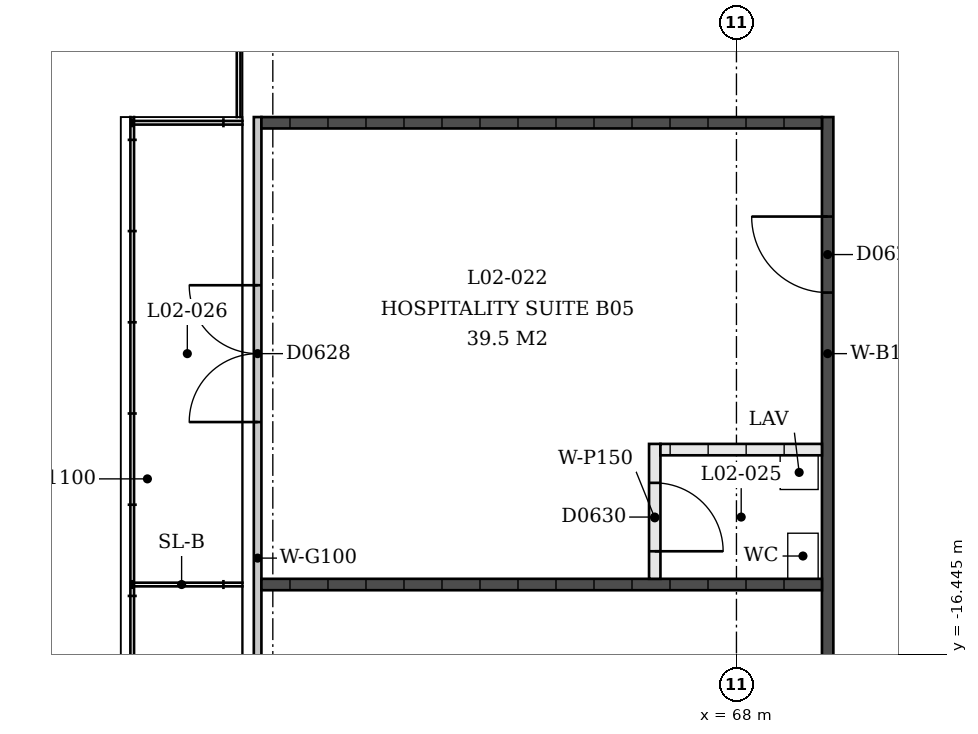
"""IFC4 building model, lengths in metres.
Left out: names, types, materials, properties, quantities, classifications, styles, units other than length and angle.
Written with IfcOpenShell. Run it as: python <this file> out.ifc"""

import sys

from ifc_helpers import new_model, si_unit, direction, frame, frame_2d, origin, place, context, subcontext, project, spatial, rectangle, extrude, element, fill, save


model = new_model("IFC4")
c1 = context("Model", 3, precision=1e-05, world=origin(), true_north=direction((0.0, 1.0)))
c2 = subcontext(c1, "Body", "Model", "MODEL_VIEW")
j1 = project(units=[si_unit("LENGTHUNIT", "METRE"), si_unit("PLANEANGLEUNIT", "RADIAN")], contexts=[c1])
p1 = place(None, origin())
s1 = spatial("IfcSite", under=j1, at=p1, CompositionType="ELEMENT")
p2 = place(p1, origin())
s2 = spatial("IfcBuilding", under=s1, at=p2, CompositionType="ELEMENT")
p3 = place(p2, frame((0.0, 0.0, 9.0)))
s3 = spatial("IfcBuildingStorey", under=s2, at=p3, CompositionType="ELEMENT", Elevation=9.0)
p4 = place(p3, frame((61.7, -22.0, 0.0), z_axis=(0.0, 0.0, 1.0), x_axis=(0.0, 1.0, 0.0)))
e1 = element("IfcWall", 1, at=p4, inside=s3, PredefinedType="PARTITIONING", context=c2, shape_type="SweptSolid", body=[
    extrude(rectangle(XDim=12.625, YDim=0.1, at=frame_2d((6.312, 0.0))), origin(), (0.0, 0.0, 1.0), 3.0),
])
p5 = place(p4, frame((2.538, 0.0, 0.0)))
e2 = element("IfcOpeningElement", 2, at=p5, cuts=e1, PredefinedType="OPENING", context=c2, shape_type="SweptSolid", body=[
    extrude(rectangle(XDim=1.8, YDim=2.1, at=frame_2d((0.9, 1.05))), frame((0.0, 0.05, 0.0), z_axis=(0.0, -1.0, 0.0), x_axis=(1.0, 0.0, 0.0)), (0.0, 0.0, 1.0), 0.1),
])
p6 = place(p4, frame((8.613, 0.0, 0.0)))
e3 = element("IfcOpeningElement", 3, at=p6, cuts=e1, PredefinedType="OPENING", context=c2, shape_type="SweptSolid", body=[
    extrude(rectangle(XDim=1.8, YDim=2.1, at=frame_2d((0.9, 1.05))), frame((0.0, 0.05, 0.0), z_axis=(0.0, -1.0, 0.0), x_axis=(1.0, 0.0, 0.0)), (0.0, 0.0, 1.0), 0.1),
])
p7 = place(p3, frame((69.2, -21.675, 0.0), z_axis=(0.0, 0.0, 1.0), x_axis=(0.0, 1.0, 0.0)))
e4 = element("IfcWall", 4, at=p7, inside=s3, PredefinedType="SOLIDWALL", context=c2, shape_type="SweptSolid", body=[
    extrude(rectangle(XDim=12.3, YDim=0.15, at=frame_2d((6.15, 0.0))), origin(), (0.0, 0.0, 1.0), 3.0),
])
p8 = place(p7, frame((3.916, 0.0, 0.0)))
e5 = element("IfcOpeningElement", 5, at=p8, cuts=e4, PredefinedType="OPENING", context=c2, shape_type="SweptSolid", body=[
    extrude(rectangle(XDim=1.0, YDim=2.1, at=frame_2d((0.5, 1.05))), frame((0.0, 0.075, 0.0), z_axis=(0.0, -1.0, 0.0), x_axis=(1.0, 0.0, 0.0)), (0.0, 0.0, 1.0), 0.15),
])
p9 = place(p7, frame((9.991, 0.0, 0.0)))
e6 = element("IfcOpeningElement", 6, at=p9, cuts=e4, PredefinedType="OPENING", context=c2, shape_type="SweptSolid", body=[
    extrude(rectangle(XDim=1.0, YDim=2.1, at=frame_2d((0.5, 1.05))), frame((0.0, 0.075, 0.0), z_axis=(0.0, -1.0, 0.0), x_axis=(1.0, 0.0, 0.0)), (0.0, 0.0, 1.0), 0.15),
])
for number, where, z_axis, x_axis in (
    (7, (61.75, -15.525, 0.0), (0.0, 0.0, 1.0), (1.0, 0.0, 0.0)),
    (8, (61.75, -9.45, 0.0), (0.0, 0.0, 1.0), (1.0, 0.0, 0.0)),
):
    element("IfcWall", number, at=place(p3, frame(where, z_axis=z_axis, x_axis=x_axis)), inside=s3, PredefinedType="SOLIDWALL", context=c2, shape_type="SweptSolid", body=[
        extrude(rectangle(XDim=7.375, YDim=0.15, at=frame_2d((3.688, 0.0))), origin(), (0.0, 0.0, 1.0), 3.0),
    ])
p10 = place(p3, frame((66.925, -15.45, 0.0), z_axis=(0.0, 0.0, 1.0), x_axis=(0.0, 1.0, 0.0)))
e9 = element("IfcWall", 9, at=p10, inside=s3, PredefinedType="PARTITIONING", context=c2, shape_type="SweptSolid", body=[
    extrude(rectangle(XDim=1.775, YDim=0.15, at=frame_2d((0.887, 0.0))), origin(), (0.0, 0.0, 1.0), 3.0),
])
p11 = place(p10, frame((0.363, 0.0, 0.0)))
e10 = element("IfcOpeningElement", 10, at=p11, cuts=e9, PredefinedType="OPENING", context=c2, shape_type="SweptSolid", body=[
    extrude(rectangle(XDim=0.9, YDim=2.1, at=frame_2d((0.45, 1.05))), frame((0.0, 0.075, 0.0), z_axis=(0.0, -1.0, 0.0), x_axis=(1.0, 0.0, 0.0)), (0.0, 0.0, 1.0), 0.15),
])
p12 = place(p3, frame((67.0, -13.75, 0.0), z_axis=(0.0, 0.0, 1.0), x_axis=(1.0, 0.0, 0.0)))
e11 = element("IfcWall", 11, at=p12, inside=s3, PredefinedType="PARTITIONING", context=c2, shape_type="SweptSolid", body=[
    extrude(rectangle(XDim=2.125, YDim=0.15, at=frame_2d((1.062, 0.0))), origin(), (0.0, 0.0, 1.0), 3.0),
])
p13 = place(p9, origin())
e12 = element("IfcDoor", 12, at=p13, inside=s3, OperationType="SINGLE_SWING_LEFT", PredefinedType="DOOR", context=c2, shape_type="SweptSolid", body=[
    extrude(rectangle(XDim=1.0, YDim=2.1, at=frame_2d((0.5, 1.05))), frame((0.0, 0.025, 0.0), z_axis=(0.0, -1.0, 0.0), x_axis=(1.0, 0.0, 0.0)), (0.0, 0.0, 1.0), 0.05),
])
fill(e6, e12)
p14 = place(p6, origin())
e13 = element("IfcDoor", 13, at=p14, inside=s3, OperationType="DOUBLE_DOOR_SINGLE_SWING", PredefinedType="DOOR", context=c2, shape_type="SweptSolid", body=[
    extrude(rectangle(XDim=1.8, YDim=2.1, at=frame_2d((0.9, 1.05))), frame((0.0, 0.025, 0.0), z_axis=(0.0, -1.0, 0.0), x_axis=(1.0, 0.0, 0.0)), (0.0, 0.0, 1.0), 0.05),
])
fill(e3, e13)
p15 = place(p11, origin())
e14 = element("IfcDoor", 14, at=p15, inside=s3, OperationType="SINGLE_SWING_LEFT", PredefinedType="DOOR", context=c2, shape_type="SweptSolid", body=[
    extrude(rectangle(XDim=0.9, YDim=2.1, at=frame_2d((0.45, 1.05))), frame((0.0, 0.025, 0.0), z_axis=(0.0, -1.0, 0.0), x_axis=(1.0, 0.0, 0.0)), (0.0, 0.0, 1.0), 0.05),
])
fill(e10, e14)
save(model, sys.argv[1])
